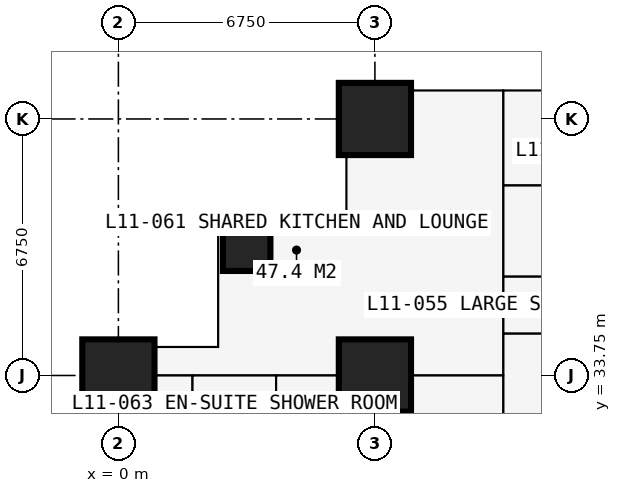
"""IFC4 building model, lengths in metres.
Left out: names, types, materials, properties, quantities, classifications, styles, units other than length and angle.
Written with IfcOpenShell. Run it as: python <this file> out.ifc"""

import sys

from ifc_helpers import new_model, si_unit, direction, frame, frame_2d, origin, origin_2d, place, context, subcontext, project, spatial, rectangle, extrude, element, fill, save


model = new_model("IFC4")
c1 = context("Model", 3, precision=1e-05, world=origin(), true_north=direction((0.0, 1.0)))
c2 = subcontext(c1, "Body", "Model", "MODEL_VIEW")
j1 = project(units=[si_unit("LENGTHUNIT", "METRE"), si_unit("PLANEANGLEUNIT", "RADIAN")], contexts=[c1])
p1 = place(None, origin())
s1 = spatial("IfcSite", under=j1, at=p1, CompositionType="ELEMENT")
p2 = place(p1, origin())
s2 = spatial("IfcBuilding", under=s1, at=p2, CompositionType="ELEMENT")
p3 = place(p2, frame((0.0, 0.0, 43.2)))
s3 = spatial("IfcBuildingStorey", under=s2, at=p3, CompositionType="ELEMENT", Elevation=43.2)
p4 = place(p3, frame((0.0, 33.75, 0.0), z_axis=(0.0, 0.0, 1.0), x_axis=(1.0, 0.0, 0.0)))
e1 = element("IfcColumn", 1, at=p4, inside=s3, PredefinedType="COLUMN", context=c2, shape_type="SweptSolid", body=[
    extrude(rectangle(XDim=1.9, YDim=1.9, at=origin_2d()), origin(), (0.0, 0.0, 1.0), 3.6),
])
p5 = place(p3, frame((3.375, 37.125, 0.0), z_axis=(0.0, 0.0, 1.0), x_axis=(1.0, 0.0, 0.0)))
e2 = element("IfcColumn", 2, at=p5, inside=s3, PredefinedType="COLUMN", context=c2, shape_type="SweptSolid", body=[
    extrude(rectangle(XDim=1.25, YDim=1.25, at=origin_2d()), origin(), (0.0, 0.0, 1.0), 3.6),
])
for number, where, z_axis, x_axis in (
    (3, (6.75, 33.75, 0.0), (0.0, 0.0, 1.0), (1.0, 0.0, 0.0)),
    (4, (6.75, 40.5, 0.0), (0.0, 0.0, 1.0), (1.0, 0.0, 0.0)),
):
    element("IfcColumn", number, at=place(p3, frame(where, z_axis=z_axis, x_axis=x_axis)), inside=s3, PredefinedType="COLUMN", context=c2, shape_type="SweptSolid", body=[
        extrude(rectangle(XDim=1.9, YDim=1.9, at=origin_2d()), origin(), (0.0, 0.0, 1.0), 3.6),
    ])
p6 = place(p3, frame((6.0, 41.25, 0.0), z_axis=(0.0, 0.0, 1.0), x_axis=(0.0, -1.0, 0.0)))
e5 = element("IfcWall", 5, at=p6, inside=s3, PredefinedType="SOLIDWALL", context=c2, shape_type="SweptSolid", body=[
    extrude(rectangle(XDim=3.375, YDim=0.3, at=frame_2d((1.688, 0.0))), origin(), (0.0, 0.0, 1.0), 3.375),
])
p7 = place(p6, frame((1.857, 0.0, 0.9)))
e6 = element("IfcOpeningElement", 6, at=p7, cuts=e5, PredefinedType="OPENING", context=c2, shape_type="SweptSolid", body=[
    extrude(rectangle(XDim=1.2, YDim=1.8, at=frame_2d((0.6, 0.9))), frame((0.0, 0.16, 0.0), z_axis=(0.0, -1.0, 0.0), x_axis=(1.0, 0.0, 0.0)), (0.0, 0.0, 1.0), 0.32),
])
p8 = place(p3, frame((6.0, 37.875, 0.0), z_axis=(0.0, 0.0, 1.0), x_axis=(-1.0, 0.0, 0.0)))
e7 = element("IfcWall", 7, at=p8, inside=s3, PredefinedType="SOLIDWALL", context=c2, shape_type="SweptSolid", body=[
    extrude(rectangle(XDim=3.375, YDim=0.3, at=frame_2d((1.688, 0.0))), origin(), (0.0, 0.0, 1.0), 3.375),
])
p9 = place(p8, frame((0.788, 0.0, 0.6)))
e8 = element("IfcOpeningElement", 8, at=p9, cuts=e7, PredefinedType="OPENING", context=c2, shape_type="SweptSolid", body=[
    extrude(rectangle(XDim=1.8, YDim=2.1, at=frame_2d((0.9, 1.05))), frame((0.0, 0.16, 0.0), z_axis=(0.0, -1.0, 0.0), x_axis=(1.0, 0.0, 0.0)), (0.0, 0.0, 1.0), 0.32),
])
p10 = place(p3, frame((2.625, 37.875, 0.0), z_axis=(0.0, 0.0, 1.0), x_axis=(0.0, -1.0, 0.0)))
e9 = element("IfcWall", 9, at=p10, inside=s3, PredefinedType="SOLIDWALL", context=c2, shape_type="SweptSolid", body=[
    extrude(rectangle(XDim=3.375, YDim=0.3, at=frame_2d((1.688, 0.0))), origin(), (0.0, 0.0, 1.0), 3.375),
])
p11 = place(p10, frame((0.788, 0.0, 0.6)))
e10 = element("IfcOpeningElement", 10, at=p11, cuts=e9, PredefinedType="OPENING", context=c2, shape_type="SweptSolid", body=[
    extrude(rectangle(XDim=1.8, YDim=2.1, at=frame_2d((0.9, 1.05))), frame((0.0, 0.16, 0.0), z_axis=(0.0, -1.0, 0.0), x_axis=(1.0, 0.0, 0.0)), (0.0, 0.0, 1.0), 0.32),
])
p12 = place(p3, frame((2.625, 34.5, 0.0), z_axis=(0.0, 0.0, 1.0), x_axis=(-1.0, 0.0, 0.0)))
e11 = element("IfcWall", 11, at=p12, inside=s3, PredefinedType="SOLIDWALL", context=c2, shape_type="SweptSolid", body=[
    extrude(rectangle(XDim=3.375, YDim=0.3, at=frame_2d((1.688, 0.0))), origin(), (0.0, 0.0, 1.0), 3.375),
])
p13 = place(p12, frame((0.317, 0.0, 0.9)))
e12 = element("IfcOpeningElement", 12, at=p13, cuts=e11, PredefinedType="OPENING", context=c2, shape_type="SweptSolid", body=[
    extrude(rectangle(XDim=1.2, YDim=1.8, at=frame_2d((0.6, 0.9))), frame((0.0, 0.16, 0.0), z_axis=(0.0, -1.0, 0.0), x_axis=(1.0, 0.0, 0.0)), (0.0, 0.0, 1.0), 0.32),
])
p14 = place(p3, frame((-0.734, 33.75, 0.0), z_axis=(0.0, 0.0, 1.0), x_axis=(1.0, 0.0, 0.0)))
e13 = element("IfcWall", 13, at=p14, inside=s3, PredefinedType="PARTITIONING", context=c2, shape_type="SweptSolid", body=[
    extrude(rectangle(XDim=10.859, YDim=0.15, at=frame_2d((5.429, 0.0))), origin(), (0.0, 0.0, 1.0), 2.877),
])
p15 = place(p14, frame((8.434, 0.0, 0.0)))
e14 = element("IfcOpeningElement", 14, at=p15, cuts=e13, PredefinedType="OPENING", context=c2, shape_type="SweptSolid", body=[
    extrude(rectangle(XDim=1.0, YDim=2.2, at=frame_2d((0.5, 1.1))), frame((0.0, 0.085, 0.0), z_axis=(0.0, -1.0, 0.0), x_axis=(1.0, 0.0, 0.0)), (0.0, 0.0, 1.0), 0.17),
])
p16 = place(p3, frame((1.95, 31.75, 0.0), z_axis=(0.0, 0.0, 1.0), x_axis=(0.0, 1.0, 0.0)))
e15 = element("IfcWall", 15, at=p16, inside=s3, PredefinedType="PARTITIONING", context=c2, shape_type="SweptSolid", body=[
    extrude(rectangle(XDim=2.0, YDim=0.1, at=frame_2d((1.0, 0.0))), origin(), (0.0, 0.0, 1.0), 3.375),
])
p17 = place(p3, frame((4.15, 10.125, 0.0), z_axis=(0.0, 0.0, 1.0), x_axis=(0.0, 1.0, 0.0)))
e16 = element("IfcWall", 16, at=p17, inside=s3, PredefinedType="PARTITIONING", context=c2, shape_type="SweptSolid", body=[
    extrude(rectangle(XDim=23.625, YDim=0.15, at=frame_2d((11.812, 0.0))), origin(), (0.0, 0.0, 1.0), 3.375),
])
p18 = place(p17, frame((20.5, 0.0, 0.0)))
e17 = element("IfcOpeningElement", 17, at=p18, cuts=e16, PredefinedType="OPENING", context=c2, shape_type="SweptSolid", body=[
    extrude(rectangle(XDim=0.95, YDim=2.2, at=frame_2d((0.475, 1.1))), frame((0.0, 0.085, 0.0), z_axis=(0.0, -1.0, 0.0), x_axis=(1.0, 0.0, 0.0)), (0.0, 0.0, 1.0), 0.17),
])
p19 = place(p17, frame((17.125, 0.0, 0.0)))
e18 = element("IfcOpeningElement", 18, at=p19, cuts=e16, PredefinedType="OPENING", context=c2, shape_type="SweptSolid", body=[
    extrude(rectangle(XDim=0.95, YDim=2.2, at=frame_2d((0.475, 1.1))), frame((0.0, 0.085, 0.0), z_axis=(0.0, -1.0, 0.0), x_axis=(1.0, 0.0, 0.0)), (0.0, 0.0, 1.0), 0.17),
])
p20 = place(p17, frame((13.7, 0.0, 0.0)))
e19 = element("IfcOpeningElement", 19, at=p20, cuts=e16, PredefinedType="OPENING", context=c2, shape_type="SweptSolid", body=[
    extrude(rectangle(XDim=0.95, YDim=2.2, at=frame_2d((0.475, 1.1))), frame((0.0, 0.085, 0.0), z_axis=(0.0, -1.0, 0.0), x_axis=(1.0, 0.0, 0.0)), (0.0, 0.0, 1.0), 0.17),
])
p21 = place(p17, frame((4.2, 0.0, 0.0)))
e20 = element("IfcOpeningElement", 20, at=p21, cuts=e16, PredefinedType="OPENING", context=c2, shape_type="SweptSolid", body=[
    extrude(rectangle(XDim=0.95, YDim=2.2, at=frame_2d((0.475, 1.1))), frame((0.0, 0.085, 0.0), z_axis=(0.0, -1.0, 0.0), x_axis=(1.0, 0.0, 0.0)), (0.0, 0.0, 1.0), 0.17),
])
p22 = place(p17, frame((10.95, 0.0, 0.0)))
e21 = element("IfcOpeningElement", 21, at=p22, cuts=e16, PredefinedType="OPENING", context=c2, shape_type="SweptSolid", body=[
    extrude(rectangle(XDim=0.95, YDim=2.2, at=frame_2d((0.475, 1.1))), frame((0.0, 0.085, 0.0), z_axis=(0.0, -1.0, 0.0), x_axis=(1.0, 0.0, 0.0)), (0.0, 0.0, 1.0), 0.17),
])
p23 = place(p3, frame((10.125, 30.375, 0.0), z_axis=(0.0, 0.0, 1.0), x_axis=(0.0, 1.0, 0.0)))
e22 = element("IfcWall", 22, at=p23, inside=s3, PredefinedType="PARTITIONING", context=c2, shape_type="SweptSolid", body=[
    extrude(rectangle(XDim=10.859, YDim=0.15, at=frame_2d((5.429, 0.0))), origin(), (0.0, 0.0, 1.0), 3.375),
])
p24 = place(p3, frame((10.125, 34.85, 0.0), z_axis=(0.0, 0.0, 1.0), x_axis=(1.0, 0.0, 0.0)))
e23 = element("IfcWall", 23, at=p24, inside=s3, PredefinedType="PARTITIONING", context=c2, shape_type="SweptSolid", body=[
    extrude(rectangle(XDim=10.762, YDim=0.15, at=frame_2d((5.381, 0.0))), origin(), (0.0, 0.0, 1.0), 3.375),
])
p25 = place(p24, frame((4.9, 0.0, 0.0)))
e24 = element("IfcOpeningElement", 24, at=p25, cuts=e23, PredefinedType="OPENING", context=c2, shape_type="SweptSolid", body=[
    extrude(rectangle(XDim=0.95, YDim=2.2, at=frame_2d((0.475, 1.1))), frame((0.0, 0.085, 0.0), z_axis=(0.0, -1.0, 0.0), x_axis=(1.0, 0.0, 0.0)), (0.0, 0.0, 1.0), 0.17),
])
p26 = place(p3, frame((10.125, 36.35, 0.0), z_axis=(0.0, 0.0, 1.0), x_axis=(1.0, 0.0, 0.0)))
e25 = element("IfcWall", 25, at=p26, inside=s3, PredefinedType="PARTITIONING", context=c2, shape_type="SweptSolid", body=[
    extrude(rectangle(XDim=23.625, YDim=0.15, at=frame_2d((11.812, 0.0))), origin(), (0.0, 0.0, 1.0), 3.375),
])
p27 = place(p26, frame((21.45, 0.0, 0.0)))
e26 = element("IfcOpeningElement", 26, at=p27, cuts=e25, PredefinedType="OPENING", context=c2, shape_type="SweptSolid", body=[
    extrude(rectangle(XDim=1.0, YDim=2.2, at=frame_2d((0.5, 1.1))), frame((0.0, 0.085, 0.0), z_axis=(0.0, -1.0, 0.0), x_axis=(1.0, 0.0, 0.0)), (0.0, 0.0, 1.0), 0.17),
])
p28 = place(p26, frame((17.125, 0.0, 0.0)))
e27 = element("IfcOpeningElement", 27, at=p28, cuts=e25, PredefinedType="OPENING", context=c2, shape_type="SweptSolid", body=[
    extrude(rectangle(XDim=0.95, YDim=2.2, at=frame_2d((0.475, 1.1))), frame((0.0, 0.085, 0.0), z_axis=(0.0, -1.0, 0.0), x_axis=(1.0, 0.0, 0.0)), (0.0, 0.0, 1.0), 0.17),
])
p29 = place(p26, frame((13.7, 0.0, 0.0)))
e28 = element("IfcOpeningElement", 28, at=p29, cuts=e25, PredefinedType="OPENING", context=c2, shape_type="SweptSolid", body=[
    extrude(rectangle(XDim=0.95, YDim=2.2, at=frame_2d((0.475, 1.1))), frame((0.0, 0.085, 0.0), z_axis=(0.0, -1.0, 0.0), x_axis=(1.0, 0.0, 0.0)), (0.0, 0.0, 1.0), 0.17),
])
p30 = place(p26, frame((4.2, 0.0, 0.0)))
e29 = element("IfcOpeningElement", 29, at=p30, cuts=e25, PredefinedType="OPENING", context=c2, shape_type="SweptSolid", body=[
    extrude(rectangle(XDim=0.95, YDim=2.2, at=frame_2d((0.475, 1.1))), frame((0.0, 0.085, 0.0), z_axis=(0.0, -1.0, 0.0), x_axis=(1.0, 0.0, 0.0)), (0.0, 0.0, 1.0), 0.17),
])
p31 = place(p26, frame((10.95, 0.0, 0.0)))
e30 = element("IfcOpeningElement", 30, at=p31, cuts=e25, PredefinedType="OPENING", context=c2, shape_type="SweptSolid", body=[
    extrude(rectangle(XDim=0.95, YDim=2.2, at=frame_2d((0.475, 1.1))), frame((0.0, 0.085, 0.0), z_axis=(0.0, -1.0, 0.0), x_axis=(1.0, 0.0, 0.0)), (0.0, 0.0, 1.0), 0.17),
])
p32 = place(p3, frame((10.125, 38.75, 0.0), z_axis=(0.0, 0.0, 1.0), x_axis=(1.0, 0.0, 0.0)))
e31 = element("IfcWall", 31, at=p32, inside=s3, PredefinedType="PARTITIONING", context=c2, shape_type="SweptSolid", body=[
    extrude(rectangle(XDim=2.6, YDim=0.1, at=frame_2d((1.3, 0.0))), origin(), (0.0, 0.0, 1.0), 3.375),
])
p33 = place(p32, frame((0.85, 0.0, 0.0)))
e32 = element("IfcOpeningElement", 32, at=p33, cuts=e31, PredefinedType="OPENING", context=c2, shape_type="SweptSolid", body=[
    extrude(rectangle(XDim=0.9, YDim=2.2, at=frame_2d((0.45, 1.1))), frame((0.0, 0.06, 0.0), z_axis=(0.0, -1.0, 0.0), x_axis=(1.0, 0.0, 0.0)), (0.0, 0.0, 1.0), 0.12),
])
p34 = place(p7, origin())
e33 = element("IfcWindow", 33, at=p34, inside=s3, PartitioningType="SINGLE_PANEL", PredefinedType="WINDOW", context=c2, shape_type="SweptSolid", body=[
    extrude(rectangle(XDim=1.2, YDim=1.8, at=frame_2d((0.6, 0.9))), frame((0.0, 0.03, 0.0), z_axis=(0.0, -1.0, 0.0), x_axis=(1.0, 0.0, 0.0)), (0.0, 0.0, 1.0), 0.06),
])
fill(e6, e33)
p35 = place(p9, origin())
e34 = element("IfcWindow", 34, at=p35, inside=s3, PartitioningType="SINGLE_PANEL", PredefinedType="WINDOW", context=c2, shape_type="SweptSolid", body=[
    extrude(rectangle(XDim=1.8, YDim=2.1, at=frame_2d((0.9, 1.05))), frame((0.0, 0.03, 0.0), z_axis=(0.0, -1.0, 0.0), x_axis=(1.0, 0.0, 0.0)), (0.0, 0.0, 1.0), 0.06),
])
fill(e8, e34)
p36 = place(p11, origin())
e35 = element("IfcWindow", 35, at=p36, inside=s3, PartitioningType="SINGLE_PANEL", PredefinedType="WINDOW", context=c2, shape_type="SweptSolid", body=[
    extrude(rectangle(XDim=1.8, YDim=2.1, at=frame_2d((0.9, 1.05))), frame((0.0, 0.03, 0.0), z_axis=(0.0, -1.0, 0.0), x_axis=(1.0, 0.0, 0.0)), (0.0, 0.0, 1.0), 0.06),
])
fill(e10, e35)
p37 = place(p13, origin())
e36 = element("IfcWindow", 36, at=p37, inside=s3, PartitioningType="SINGLE_PANEL", PredefinedType="WINDOW", context=c2, shape_type="SweptSolid", body=[
    extrude(rectangle(XDim=1.2, YDim=1.8, at=frame_2d((0.6, 0.9))), frame((0.0, 0.03, 0.0), z_axis=(0.0, -1.0, 0.0), x_axis=(1.0, 0.0, 0.0)), (0.0, 0.0, 1.0), 0.06),
])
fill(e12, e36)
p38 = place(p33, origin())
e37 = element("IfcDoor", 37, at=p38, inside=s3, OperationType="SINGLE_SWING_RIGHT", PredefinedType="DOOR", context=c2, shape_type="SweptSolid", body=[
    extrude(rectangle(XDim=0.9, YDim=2.2, at=frame_2d((0.45, 1.1))), frame((0.0, 0.025, 0.0), z_axis=(0.0, -1.0, 0.0), x_axis=(1.0, 0.0, 0.0)), (0.0, 0.0, 1.0), 0.05),
])
fill(e32, e37)
p39 = place(p15, origin())
e38 = element("IfcDoor", 38, at=p39, inside=s3, OperationType="SINGLE_SWING_LEFT", PredefinedType="DOOR", context=c2, shape_type="SweptSolid", body=[
    extrude(rectangle(XDim=1.0, YDim=2.2, at=frame_2d((0.5, 1.1))), frame((0.0, 0.025, 0.0), z_axis=(0.0, -1.0, 0.0), x_axis=(1.0, 0.0, 0.0)), (0.0, 0.0, 1.0), 0.05),
])
fill(e14, e38)
save(model, sys.argv[1])
